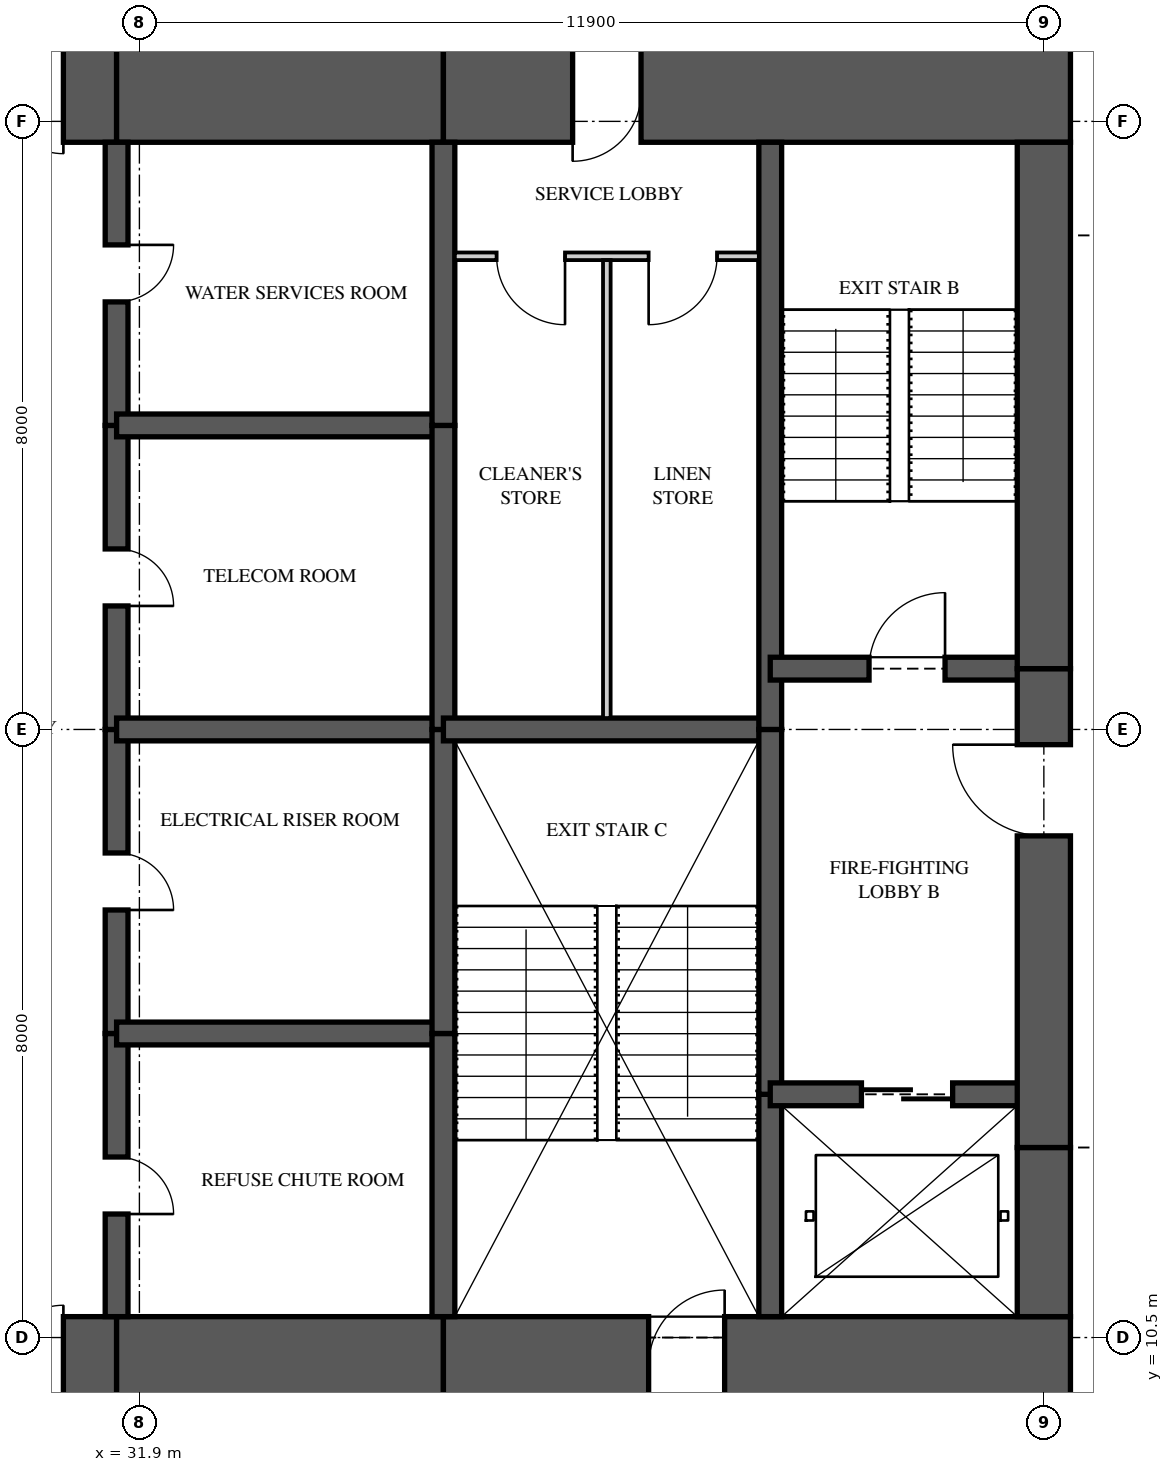
"""IFC4 building model, lengths in metres.
Left out: names, types, materials, properties, quantities, classifications, styles, units other than length and angle.
Written with IfcOpenShell. Run it as: python <this file> out.ifc"""

import sys

from ifc_helpers import new_model, si_unit, direction, frame, frame_2d, origin, place, context, subcontext, project, spatial, rectangle, extrude, element, fill, save


model = new_model("IFC4")
c1 = context("Model", 3, precision=1e-05, world=origin(), true_north=direction((0.0, 1.0)))
c2 = subcontext(c1, "Body", "Model", "MODEL_VIEW")
j1 = project(units=[si_unit("LENGTHUNIT", "METRE"), si_unit("PLANEANGLEUNIT", "RADIAN")], contexts=[c1])
p1 = place(None, origin())
s1 = spatial("IfcSite", under=j1, at=p1, CompositionType="ELEMENT")
p2 = place(p1, origin())
s2 = spatial("IfcBuilding", under=s1, at=p2, CompositionType="ELEMENT")
p3 = place(p2, frame((0.0, 0.0, 177.8)))
s3 = spatial("IfcBuildingStorey", under=s2, at=p3, CompositionType="ELEMENT", Elevation=177.8)
p4 = place(p3, frame((26.0, 10.125, 0.0), z_axis=(0.0, 0.0, 1.0), x_axis=(1.0, 0.0, 0.0)))
e1 = element("IfcWall", 1, at=p4, inside=s3, PredefinedType="SHEAR", context=c2, shape_type="SweptSolid", body=[
    extrude(rectangle(XDim=5.6, YDim=1.3, at=frame_2d((2.8, 0.0))), origin(), (0.0, 0.0, 1.0), 3.35),
])
p5 = place(p4, frame((3.3, 0.0, 0.0)))
e2 = element("IfcOpeningElement", 2, at=p5, cuts=e1, PredefinedType="OPENING", context=c2, shape_type="SweptSolid", body=[
    extrude(rectangle(XDim=1.6, YDim=2.1, at=frame_2d((0.8, 1.05))), frame((0.0, 0.66, 0.0), z_axis=(0.0, -1.0, 0.0), x_axis=(1.0, 0.0, 0.0)), (0.0, 0.0, 1.0), 1.32),
])
p6 = place(p3, frame((31.6, 10.125, 0.0), z_axis=(0.0, 0.0, 1.0), x_axis=(1.0, 0.0, 0.0)))
e3 = element("IfcWall", 3, at=p6, inside=s3, PredefinedType="SHEAR", context=c2, shape_type="SweptSolid", body=[
    extrude(rectangle(XDim=4.3, YDim=1.3, at=frame_2d((2.15, 0.0))), origin(), (0.0, 0.0, 1.0), 3.35),
])
p7 = place(p3, frame((35.9, 10.125, 0.0), z_axis=(0.0, 0.0, 1.0), x_axis=(1.0, 0.0, 0.0)))
e4 = element("IfcWall", 4, at=p7, inside=s3, PredefinedType="SHEAR", context=c2, shape_type="SweptSolid", body=[
    extrude(rectangle(XDim=8.25, YDim=1.3, at=frame_2d((4.125, 0.0))), origin(), (0.0, 0.0, 1.0), 3.35),
])
p8 = place(p7, frame((2.7, 0.0, 0.0)))
e5 = element("IfcOpeningElement", 5, at=p8, cuts=e4, PredefinedType="OPENING", context=c2, shape_type="SweptSolid", body=[
    extrude(rectangle(XDim=1.0, YDim=2.1, at=frame_2d((0.5, 1.05))), frame((0.0, 0.66, 0.0), z_axis=(0.0, -1.0, 0.0), x_axis=(1.0, 0.0, 0.0)), (0.0, 0.0, 1.0), 1.32),
])
p9 = place(p3, frame((44.15, 26.875, 0.0), z_axis=(0.0, 0.0, 1.0), x_axis=(-1.0, 0.0, 0.0)))
e6 = element("IfcWall", 6, at=p9, inside=s3, PredefinedType="SHEAR", context=c2, shape_type="SweptSolid", body=[
    extrude(rectangle(XDim=8.25, YDim=1.3, at=frame_2d((4.125, 0.0))), origin(), (0.0, 0.0, 1.0), 3.35),
])
p10 = place(p9, frame((5.65, 0.0, 0.0)))
e7 = element("IfcOpeningElement", 7, at=p10, cuts=e6, PredefinedType="OPENING", context=c2, shape_type="SweptSolid", body=[
    extrude(rectangle(XDim=0.9, YDim=2.1, at=frame_2d((0.45, 1.05))), frame((0.0, 0.66, 0.0), z_axis=(0.0, -1.0, 0.0), x_axis=(1.0, 0.0, 0.0)), (0.0, 0.0, 1.0), 1.32),
])
p11 = place(p3, frame((35.9, 26.875, 0.0), z_axis=(0.0, 0.0, 1.0), x_axis=(-1.0, 0.0, 0.0)))
e8 = element("IfcWall", 8, at=p11, inside=s3, PredefinedType="SHEAR", context=c2, shape_type="SweptSolid", body=[
    extrude(rectangle(XDim=4.3, YDim=1.3, at=frame_2d((2.15, 0.0))), origin(), (0.0, 0.0, 1.0), 3.35),
])
p12 = place(p3, frame((31.6, 26.875, 0.0), z_axis=(0.0, 0.0, 1.0), x_axis=(-1.0, 0.0, 0.0)))
e9 = element("IfcWall", 9, at=p12, inside=s3, PredefinedType="SHEAR", context=c2, shape_type="SweptSolid", body=[
    extrude(rectangle(XDim=5.6, YDim=1.3, at=frame_2d((2.8, 0.0))), origin(), (0.0, 0.0, 1.0), 3.35),
])
p13 = place(p12, frame((0.7, 0.0, 0.0)))
e10 = element("IfcOpeningElement", 10, at=p13, cuts=e9, PredefinedType="OPENING", context=c2, shape_type="SweptSolid", body=[
    extrude(rectangle(XDim=1.6, YDim=2.1, at=frame_2d((0.8, 1.05))), frame((0.0, 0.66, 0.0), z_axis=(0.0, -1.0, 0.0), x_axis=(1.0, 0.0, 0.0)), (0.0, 0.0, 1.0), 1.32),
])
p14 = place(p3, frame((43.8, 10.775, 0.0), z_axis=(0.0, 0.0, 1.0), x_axis=(0.0, 1.0, 0.0)))
e11 = element("IfcWall", 11, at=p14, inside=s3, PredefinedType="SHEAR", context=c2, shape_type="SweptSolid", body=[
    extrude(rectangle(XDim=2.225, YDim=0.7, at=frame_2d((1.113, 0.0))), origin(), (0.0, 0.0, 1.0), 3.35),
])
p15 = place(p3, frame((43.8, 13.0, 0.0), z_axis=(0.0, 0.0, 1.0), x_axis=(0.0, 1.0, 0.0)))
e12 = element("IfcWall", 12, at=p15, inside=s3, PredefinedType="SHEAR", context=c2, shape_type="SweptSolid", body=[
    extrude(rectangle(XDim=6.3, YDim=0.7, at=frame_2d((3.15, 0.0))), origin(), (0.0, 0.0, 1.0), 3.35),
])
p16 = place(p15, frame((4.1, 0.0, 0.0)))
e13 = element("IfcOpeningElement", 13, at=p16, cuts=e12, PredefinedType="OPENING", context=c2, shape_type="SweptSolid", body=[
    extrude(rectangle(XDim=1.2, YDim=2.2, at=frame_2d((0.6, 1.1))), frame((0.0, 0.36, 0.0), z_axis=(0.0, -1.0, 0.0), x_axis=(1.0, 0.0, 0.0)), (0.0, 0.0, 1.0), 0.72),
])
p17 = place(p3, frame((43.8, 19.3, 0.0), z_axis=(0.0, 0.0, 1.0), x_axis=(0.0, 1.0, 0.0)))
e14 = element("IfcWall", 14, at=p17, inside=s3, PredefinedType="SHEAR", context=c2, shape_type="SweptSolid", body=[
    extrude(rectangle(XDim=6.925, YDim=0.7, at=frame_2d((3.462, 0.0))), origin(), (0.0, 0.0, 1.0), 3.35),
])
p18 = place(p3, frame((31.6, 10.775, 0.0), z_axis=(0.0, 0.0, 1.0), x_axis=(0.0, 1.0, 0.0)))
e15 = element("IfcWall", 15, at=p18, inside=s3, PredefinedType="SHEAR", context=c2, shape_type="SweptSolid", body=[
    extrude(rectangle(XDim=3.725, YDim=0.3, at=frame_2d((1.863, 0.0))), origin(), (0.0, 0.0, 1.0), 3.35),
])
p19 = place(p18, frame((1.35, 0.0, 0.0)))
e16 = element("IfcOpeningElement", 16, at=p19, cuts=e15, PredefinedType="OPENING", context=c2, shape_type="SweptSolid", body=[
    extrude(rectangle(XDim=0.75, YDim=2.1, at=frame_2d((0.375, 1.05))), frame((0.0, 0.16, 0.0), z_axis=(0.0, -1.0, 0.0), x_axis=(1.0, 0.0, 0.0)), (0.0, 0.0, 1.0), 0.32),
])
p20 = place(p3, frame((31.6, 14.5, 0.0), z_axis=(0.0, 0.0, 1.0), x_axis=(0.0, 1.0, 0.0)))
e17 = element("IfcWall", 17, at=p20, inside=s3, PredefinedType="SHEAR", context=c2, shape_type="SweptSolid", body=[
    extrude(rectangle(XDim=4.0, YDim=0.3, at=frame_2d((2.0, 0.0))), origin(), (0.0, 0.0, 1.0), 3.35),
])
p21 = place(p20, frame((1.625, 0.0, 0.0)))
e18 = element("IfcOpeningElement", 18, at=p21, cuts=e17, PredefinedType="OPENING", context=c2, shape_type="SweptSolid", body=[
    extrude(rectangle(XDim=0.75, YDim=2.1, at=frame_2d((0.375, 1.05))), frame((0.0, 0.16, 0.0), z_axis=(0.0, -1.0, 0.0), x_axis=(1.0, 0.0, 0.0)), (0.0, 0.0, 1.0), 0.32),
])
p22 = place(p3, frame((31.6, 18.5, 0.0), z_axis=(0.0, 0.0, 1.0), x_axis=(0.0, 1.0, 0.0)))
e19 = element("IfcWall", 19, at=p22, inside=s3, PredefinedType="SHEAR", context=c2, shape_type="SweptSolid", body=[
    extrude(rectangle(XDim=4.0, YDim=0.3, at=frame_2d((2.0, 0.0))), origin(), (0.0, 0.0, 1.0), 3.35),
])
p23 = place(p22, frame((1.625, 0.0, 0.0)))
e20 = element("IfcOpeningElement", 20, at=p23, cuts=e19, PredefinedType="OPENING", context=c2, shape_type="SweptSolid", body=[
    extrude(rectangle(XDim=0.75, YDim=2.1, at=frame_2d((0.375, 1.05))), frame((0.0, 0.16, 0.0), z_axis=(0.0, -1.0, 0.0), x_axis=(1.0, 0.0, 0.0)), (0.0, 0.0, 1.0), 0.32),
])
p24 = place(p3, frame((31.6, 22.5, 0.0), z_axis=(0.0, 0.0, 1.0), x_axis=(0.0, 1.0, 0.0)))
e21 = element("IfcWall", 21, at=p24, inside=s3, PredefinedType="SHEAR", context=c2, shape_type="SweptSolid", body=[
    extrude(rectangle(XDim=3.725, YDim=0.3, at=frame_2d((1.863, 0.0))), origin(), (0.0, 0.0, 1.0), 3.35),
])
p25 = place(p24, frame((1.625, 0.0, 0.0)))
e22 = element("IfcOpeningElement", 22, at=p25, cuts=e21, PredefinedType="OPENING", context=c2, shape_type="SweptSolid", body=[
    extrude(rectangle(XDim=0.75, YDim=2.1, at=frame_2d((0.375, 1.05))), frame((0.0, 0.16, 0.0), z_axis=(0.0, -1.0, 0.0), x_axis=(1.0, 0.0, 0.0)), (0.0, 0.0, 1.0), 0.32),
])
p26 = place(p3, frame((35.9, 10.775, 0.0), z_axis=(0.0, 0.0, 1.0), x_axis=(0.0, 1.0, 0.0)))
e23 = element("IfcWall", 23, at=p26, inside=s3, PredefinedType="SHEAR", context=c2, shape_type="SweptSolid", body=[
    extrude(rectangle(XDim=3.725, YDim=0.3, at=frame_2d((1.863, 0.0))), origin(), (0.0, 0.0, 1.0), 3.35),
])
for number, where, z_axis, x_axis in (
    (24, (35.9, 14.5, 0.0), (0.0, 0.0, 1.0), (0.0, 1.0, 0.0)),
    (25, (35.9, 18.5, 0.0), (0.0, 0.0, 1.0), (0.0, 1.0, 0.0)),
):
    element("IfcWall", number, at=place(p3, frame(where, z_axis=z_axis, x_axis=x_axis)), inside=s3, PredefinedType="SHEAR", context=c2, shape_type="SweptSolid", body=[
        extrude(rectangle(XDim=4.0, YDim=0.3, at=frame_2d((2.0, 0.0))), origin(), (0.0, 0.0, 1.0), 3.35),
    ])
p27 = place(p3, frame((35.9, 22.5, 0.0), z_axis=(0.0, 0.0, 1.0), x_axis=(0.0, 1.0, 0.0)))
e26 = element("IfcWall", 26, at=p27, inside=s3, PredefinedType="SHEAR", context=c2, shape_type="SweptSolid", body=[
    extrude(rectangle(XDim=3.725, YDim=0.3, at=frame_2d((1.863, 0.0))), origin(), (0.0, 0.0, 1.0), 3.35),
])
p28 = place(p3, frame((40.2, 10.775, 0.0), z_axis=(0.0, 0.0, 1.0), x_axis=(0.0, 1.0, 0.0)))
e27 = element("IfcWall", 27, at=p28, inside=s3, PredefinedType="SHEAR", context=c2, shape_type="SweptSolid", body=[
    extrude(rectangle(XDim=2.925, YDim=0.3, at=frame_2d((1.462, 0.0))), origin(), (0.0, 0.0, 1.0), 3.35),
])
p29 = place(p3, frame((40.2, 13.7, 0.0), z_axis=(0.0, 0.0, 1.0), x_axis=(0.0, 1.0, 0.0)))
e28 = element("IfcWall", 28, at=p29, inside=s3, PredefinedType="SHEAR", context=c2, shape_type="SweptSolid", body=[
    extrude(rectangle(XDim=4.8, YDim=0.3, at=frame_2d((2.4, 0.0))), origin(), (0.0, 0.0, 1.0), 3.35),
])
p30 = place(p3, frame((40.2, 18.5, 0.0), z_axis=(0.0, 0.0, 1.0), x_axis=(0.0, 1.0, 0.0)))
e29 = element("IfcWall", 29, at=p30, inside=s3, PredefinedType="SHEAR", context=c2, shape_type="SweptSolid", body=[
    extrude(rectangle(XDim=7.725, YDim=0.3, at=frame_2d((3.863, 0.0))), origin(), (0.0, 0.0, 1.0), 3.35),
])
for number, where, z_axis, x_axis in (
    (30, (31.6, 14.5, 0.0), (0.0, 0.0, 1.0), (1.0, 0.0, 0.0)),
    (31, (31.6, 18.5, 0.0), (0.0, 0.0, 1.0), (1.0, 0.0, 0.0)),
    (32, (31.6, 22.5, 0.0), (0.0, 0.0, 1.0), (1.0, 0.0, 0.0)),
):
    element("IfcWall", number, at=place(p3, frame(where, z_axis=z_axis, x_axis=x_axis)), inside=s3, PredefinedType="SHEAR", context=c2, shape_type="SweptSolid", body=[
        extrude(rectangle(XDim=4.3, YDim=0.3, at=frame_2d((2.15, 0.0))), origin(), (0.0, 0.0, 1.0), 3.35),
    ])
p31 = place(p3, frame((35.9, 18.5, 0.0), z_axis=(0.0, 0.0, 1.0), x_axis=(1.0, 0.0, 0.0)))
e33 = element("IfcWall", 33, at=p31, inside=s3, PredefinedType="SHEAR", context=c2, shape_type="SweptSolid", body=[
    extrude(rectangle(XDim=4.3, YDim=0.3, at=frame_2d((2.15, 0.0))), origin(), (0.0, 0.0, 1.0), 3.35),
])
p32 = place(p3, frame((40.2, 13.7, 0.0), z_axis=(0.0, 0.0, 1.0), x_axis=(1.0, 0.0, 0.0)))
e34 = element("IfcWall", 34, at=p32, inside=s3, PredefinedType="SHEAR", context=c2, shape_type="SweptSolid", body=[
    extrude(rectangle(XDim=3.6, YDim=0.3, at=frame_2d((1.8, 0.0))), origin(), (0.0, 0.0, 1.0), 3.35),
])
p33 = place(p32, frame((1.2, 0.0, 0.0)))
e35 = element("IfcOpeningElement", 35, at=p33, cuts=e34, PredefinedType="OPENING", context=c2, shape_type="SweptSolid", body=[
    extrude(rectangle(XDim=1.2, YDim=2.1, at=frame_2d((0.6, 1.05))), frame((0.0, 0.16, 0.0), z_axis=(0.0, -1.0, 0.0), x_axis=(1.0, 0.0, 0.0)), (0.0, 0.0, 1.0), 0.32),
])
p34 = place(p3, frame((40.2, 19.3, 0.0), z_axis=(0.0, 0.0, 1.0), x_axis=(1.0, 0.0, 0.0)))
e36 = element("IfcWall", 36, at=p34, inside=s3, PredefinedType="SHEAR", context=c2, shape_type="SweptSolid", body=[
    extrude(rectangle(XDim=3.6, YDim=0.3, at=frame_2d((1.8, 0.0))), origin(), (0.0, 0.0, 1.0), 3.35),
])
p35 = place(p34, frame((1.3, 0.0, 0.0)))
e37 = element("IfcOpeningElement", 37, at=p35, cuts=e36, PredefinedType="OPENING", context=c2, shape_type="SweptSolid", body=[
    extrude(rectangle(XDim=1.0, YDim=2.1, at=frame_2d((0.5, 1.05))), frame((0.0, 0.16, 0.0), z_axis=(0.0, -1.0, 0.0), x_axis=(1.0, 0.0, 0.0)), (0.0, 0.0, 1.0), 0.32),
])
p36 = place(p3, frame((36.05, 24.725, 0.0), z_axis=(0.0, 0.0, 1.0), x_axis=(1.0, 0.0, 0.0)))
e38 = element("IfcWall", 38, at=p36, inside=s3, PredefinedType="PARTITIONING", context=c2, shape_type="SweptSolid", body=[
    extrude(rectangle(XDim=4.0, YDim=0.1, at=frame_2d((2.0, 0.0))), origin(), (0.0, 0.0, 1.0), 3.11),
])
p37 = place(p36, frame((0.55, 0.0, 0.0)))
e39 = element("IfcOpeningElement", 39, at=p37, cuts=e38, PredefinedType="OPENING", context=c2, shape_type="SweptSolid", body=[
    extrude(rectangle(XDim=0.9, YDim=2.1, at=frame_2d((0.45, 1.05))), frame((0.0, 0.06, 0.0), z_axis=(0.0, -1.0, 0.0), x_axis=(1.0, 0.0, 0.0)), (0.0, 0.0, 1.0), 0.12),
])
p38 = place(p36, frame((2.55, 0.0, 0.0)))
e40 = element("IfcOpeningElement", 40, at=p38, cuts=e38, PredefinedType="OPENING", context=c2, shape_type="SweptSolid", body=[
    extrude(rectangle(XDim=0.9, YDim=2.1, at=frame_2d((0.45, 1.05))), frame((0.0, 0.06, 0.0), z_axis=(0.0, -1.0, 0.0), x_axis=(1.0, 0.0, 0.0)), (0.0, 0.0, 1.0), 0.12),
])
p39 = place(p3, frame((38.05, 18.65, 0.0), z_axis=(0.0, 0.0, 1.0), x_axis=(0.0, 1.0, 0.0)))
e41 = element("IfcWall", 41, at=p39, inside=s3, PredefinedType="PARTITIONING", context=c2, shape_type="SweptSolid", body=[
    extrude(rectangle(XDim=6.025, YDim=0.1, at=frame_2d((3.013, 0.0))), origin(), (0.0, 0.0, 1.0), 3.11),
])
p40 = place(p37, frame((0.9, 0.0, 0.0), z_axis=(0.0, 0.0, 1.0), x_axis=(-1.0, 0.0, 0.0)))
e42 = element("IfcDoor", 42, at=p40, inside=s3, OperationType="SINGLE_SWING_LEFT", PredefinedType="DOOR", context=c2, shape_type="SweptSolid", body=[
    extrude(rectangle(XDim=0.9, YDim=2.1, at=frame_2d((0.45, 1.05))), frame((0.0, 0.025, 0.0), z_axis=(0.0, -1.0, 0.0), x_axis=(1.0, 0.0, 0.0)), (0.0, 0.0, 1.0), 0.05),
])
fill(e39, e42)
p41 = place(p38, frame((0.9, 0.0, 0.0), z_axis=(0.0, 0.0, 1.0), x_axis=(-1.0, 0.0, 0.0)))
e43 = element("IfcDoor", 43, at=p41, inside=s3, OperationType="SINGLE_SWING_RIGHT", PredefinedType="DOOR", context=c2, shape_type="SweptSolid", body=[
    extrude(rectangle(XDim=0.9, YDim=2.1, at=frame_2d((0.45, 1.05))), frame((0.0, 0.025, 0.0), z_axis=(0.0, -1.0, 0.0), x_axis=(1.0, 0.0, 0.0)), (0.0, 0.0, 1.0), 0.05),
])
fill(e40, e43)
p42 = place(p35, origin())
e44 = element("IfcDoor", 44, at=p42, inside=s3, OperationType="SINGLE_SWING_RIGHT", PredefinedType="DOOR", context=c2, shape_type="SweptSolid", body=[
    extrude(rectangle(XDim=1.0, YDim=2.1, at=frame_2d((0.5, 1.05))), frame((0.0, 0.025, 0.0), z_axis=(0.0, -1.0, 0.0), x_axis=(1.0, 0.0, 0.0)), (0.0, 0.0, 1.0), 0.05),
])
fill(e37, e44)
p43 = place(p16, origin())
e45 = element("IfcDoor", 45, at=p43, inside=s3, OperationType="SINGLE_SWING_RIGHT", PredefinedType="DOOR", context=c2, shape_type="SweptSolid", body=[
    extrude(rectangle(XDim=1.2, YDim=2.2, at=frame_2d((0.6, 1.1))), frame((0.0, 0.025, 0.0), z_axis=(0.0, -1.0, 0.0), x_axis=(1.0, 0.0, 0.0)), (0.0, 0.0, 1.0), 0.05),
])
fill(e13, e45)
p44 = place(p33, origin())
e46 = element("IfcDoor", 46, at=p44, inside=s3, OperationType="SLIDING_TO_LEFT", PredefinedType="DOOR", context=c2, shape_type="SweptSolid", body=[
    extrude(rectangle(XDim=1.2, YDim=2.1, at=frame_2d((0.6, 1.05))), frame((0.0, 0.025, 0.0), z_axis=(0.0, -1.0, 0.0), x_axis=(1.0, 0.0, 0.0)), (0.0, 0.0, 1.0), 0.05),
])
fill(e35, e46)
p45 = place(p5, origin())
e47 = element("IfcDoor", 47, at=p45, inside=s3, OperationType="DOUBLE_DOOR_SINGLE_SWING", PredefinedType="DOOR", context=c2, shape_type="SweptSolid", body=[
    extrude(rectangle(XDim=1.6, YDim=2.1, at=frame_2d((0.8, 1.05))), frame((0.0, 0.025, 0.0), z_axis=(0.0, -1.0, 0.0), x_axis=(1.0, 0.0, 0.0)), (0.0, 0.0, 1.0), 0.05),
])
fill(e2, e47)
p46 = place(p13, origin())
e48 = element("IfcDoor", 48, at=p46, inside=s3, OperationType="DOUBLE_DOOR_SINGLE_SWING", PredefinedType="DOOR", context=c2, shape_type="SweptSolid", body=[
    extrude(rectangle(XDim=1.6, YDim=2.1, at=frame_2d((0.8, 1.05))), frame((0.0, 0.025, 0.0), z_axis=(0.0, -1.0, 0.0), x_axis=(1.0, 0.0, 0.0)), (0.0, 0.0, 1.0), 0.05),
])
fill(e10, e48)
p47 = place(p19, frame((0.75, 0.0, 0.0), z_axis=(0.0, 0.0, 1.0), x_axis=(-1.0, 0.0, 0.0)))
e49 = element("IfcDoor", 49, at=p47, inside=s3, OperationType="SINGLE_SWING_RIGHT", PredefinedType="DOOR", context=c2, shape_type="SweptSolid", body=[
    extrude(rectangle(XDim=0.75, YDim=2.1, at=frame_2d((0.375, 1.05))), frame((0.0, 0.025, 0.0), z_axis=(0.0, -1.0, 0.0), x_axis=(1.0, 0.0, 0.0)), (0.0, 0.0, 1.0), 0.05),
])
fill(e16, e49)
p48 = place(p21, frame((0.75, 0.0, 0.0), z_axis=(0.0, 0.0, 1.0), x_axis=(-1.0, 0.0, 0.0)))
e50 = element("IfcDoor", 50, at=p48, inside=s3, OperationType="SINGLE_SWING_RIGHT", PredefinedType="DOOR", context=c2, shape_type="SweptSolid", body=[
    extrude(rectangle(XDim=0.75, YDim=2.1, at=frame_2d((0.375, 1.05))), frame((0.0, 0.025, 0.0), z_axis=(0.0, -1.0, 0.0), x_axis=(1.0, 0.0, 0.0)), (0.0, 0.0, 1.0), 0.05),
])
fill(e18, e50)
p49 = place(p23, frame((0.75, 0.0, 0.0), z_axis=(0.0, 0.0, 1.0), x_axis=(-1.0, 0.0, 0.0)))
e51 = element("IfcDoor", 51, at=p49, inside=s3, OperationType="SINGLE_SWING_RIGHT", PredefinedType="DOOR", context=c2, shape_type="SweptSolid", body=[
    extrude(rectangle(XDim=0.75, YDim=2.1, at=frame_2d((0.375, 1.05))), frame((0.0, 0.025, 0.0), z_axis=(0.0, -1.0, 0.0), x_axis=(1.0, 0.0, 0.0)), (0.0, 0.0, 1.0), 0.05),
])
fill(e20, e51)
p50 = place(p25, frame((0.75, 0.0, 0.0), z_axis=(0.0, 0.0, 1.0), x_axis=(-1.0, 0.0, 0.0)))
e52 = element("IfcDoor", 52, at=p50, inside=s3, OperationType="SINGLE_SWING_LEFT", PredefinedType="DOOR", context=c2, shape_type="SweptSolid", body=[
    extrude(rectangle(XDim=0.75, YDim=2.1, at=frame_2d((0.375, 1.05))), frame((0.0, 0.025, 0.0), z_axis=(0.0, -1.0, 0.0), x_axis=(1.0, 0.0, 0.0)), (0.0, 0.0, 1.0), 0.05),
])
fill(e22, e52)
p51 = place(p8, origin())
e53 = element("IfcDoor", 53, at=p51, inside=s3, OperationType="SINGLE_SWING_RIGHT", PredefinedType="DOOR", context=c2, shape_type="SweptSolid", body=[
    extrude(rectangle(XDim=1.0, YDim=2.1, at=frame_2d((0.5, 1.05))), frame((0.0, 0.025, 0.0), z_axis=(0.0, -1.0, 0.0), x_axis=(1.0, 0.0, 0.0)), (0.0, 0.0, 1.0), 0.05),
])
fill(e5, e53)
p52 = place(p10, origin())
e54 = element("IfcDoor", 54, at=p52, inside=s3, OperationType="SINGLE_SWING_RIGHT", PredefinedType="DOOR", context=c2, shape_type="SweptSolid", body=[
    extrude(rectangle(XDim=0.9, YDim=2.1, at=frame_2d((0.45, 1.05))), frame((0.0, 0.47, 0.0), z_axis=(0.0, -1.0, 0.0), x_axis=(1.0, 0.0, 0.0)), (0.0, 0.0, 1.0), 0.8),
])
fill(e7, e54)
save(model, sys.argv[1])
